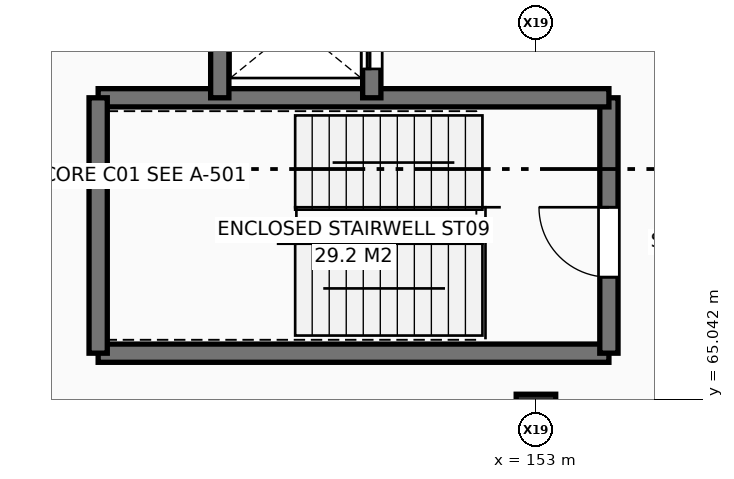
"""IFC4 building model, lengths in metres.
Left out: names, types, materials, properties, quantities, classifications, styles, units other than length and angle.
Written with IfcOpenShell. Run it as: python <this file> out.ifc"""

import sys

from ifc_helpers import new_model, si_unit, direction, frame, frame_2d, origin, origin_2d, place, context, subcontext, project, spatial, rectangle, extrude, element, fill, save


model = new_model("IFC4")
c1 = context("Model", 3, precision=1e-05, world=origin(), true_north=direction((0.0, 1.0)))
c2 = subcontext(c1, "Body", "Model", "MODEL_VIEW")
j1 = project(units=[si_unit("LENGTHUNIT", "METRE"), si_unit("PLANEANGLEUNIT", "RADIAN")], contexts=[c1])
p1 = place(None, origin())
s1 = spatial("IfcSite", under=j1, at=p1, CompositionType="ELEMENT")
p2 = place(p1, origin())
s2 = spatial("IfcBuilding", under=s1, at=p2, CompositionType="ELEMENT")
p3 = place(p2, frame((0.0, 0.0, 9.6)))
s3 = spatial("IfcBuildingStorey", under=s2, at=p3, CompositionType="ELEMENT", Elevation=9.6)
p4 = place(p3, frame((153.0, 64.8, 0.0), z_axis=(0.0, 0.0, 1.0), x_axis=(1.0, 0.0, 0.0)))
e1 = element("IfcColumn", 1, at=p4, inside=s3, PredefinedType="COLUMN", context=c2, shape_type="SweptSolid", body=[
    extrude(rectangle(XDim=0.65, YDim=0.65, at=origin_2d()), origin(), (0.0, 0.0, 1.0), 4.2),
])
p5 = place(p3, frame((145.8, 65.8, 0.0), z_axis=(0.0, 0.0, 1.0), x_axis=(1.0, 0.0, 0.0)))
e2 = element("IfcWall", 2, at=p5, inside=s3, PredefinedType="SHEAR", context=c2, shape_type="SweptSolid", body=[
    extrude(rectangle(XDim=8.4, YDim=0.3, at=frame_2d((4.2, 0.0))), origin(), (0.0, 0.0, 1.0), 3.92),
])
p6 = place(p3, frame((154.2, 65.8, 0.0), z_axis=(0.0, 0.0, 1.0), x_axis=(0.0, 1.0, 0.0)))
e3 = element("IfcWall", 3, at=p6, inside=s3, PredefinedType="SHEAR", context=c2, shape_type="SweptSolid", body=[
    extrude(rectangle(XDim=4.2, YDim=0.3, at=frame_2d((2.1, 0.0))), origin(), (0.0, 0.0, 1.0), 3.92),
])
p7 = place(p6, frame((1.25, 0.0, 0.0)))
e4 = element("IfcOpeningElement", 4, at=p7, cuts=e3, PredefinedType="OPENING", context=c2, shape_type="SweptSolid", body=[
    extrude(rectangle(XDim=1.15, YDim=2.2, at=frame_2d((0.575, 1.1))), frame((0.0, 0.16, 0.0), z_axis=(0.0, -1.0, 0.0), x_axis=(1.0, 0.0, 0.0)), (0.0, 0.0, 1.0), 0.32),
])
p8 = place(p3, frame((154.2, 70.0, 0.0), z_axis=(0.0, 0.0, 1.0), x_axis=(-1.0, 0.0, 0.0)))
e5 = element("IfcWall", 5, at=p8, inside=s3, PredefinedType="SHEAR", context=c2, shape_type="SweptSolid", body=[
    extrude(rectangle(XDim=8.4, YDim=0.3, at=frame_2d((4.2, 0.0))), origin(), (0.0, 0.0, 1.0), 3.92),
])
p9 = place(p3, frame((145.8, 70.0, 0.0), z_axis=(0.0, 0.0, 1.0), x_axis=(0.0, -1.0, 0.0)))
e6 = element("IfcWall", 6, at=p9, inside=s3, PredefinedType="SHEAR", context=c2, shape_type="SweptSolid", body=[
    extrude(rectangle(XDim=4.2, YDim=0.3, at=frame_2d((2.1, 0.0))), origin(), (0.0, 0.0, 1.0), 3.92),
])
p10 = place(p3, frame((147.8, 72.4, 0.0), z_axis=(0.0, 0.0, 1.0), x_axis=(0.0, -1.0, 0.0)))
e7 = element("IfcWall", 7, at=p10, inside=s3, PredefinedType="SHEAR", context=c2, shape_type="SweptSolid", body=[
    extrude(rectangle(XDim=2.4, YDim=0.3, at=frame_2d((1.2, 0.0))), origin(), (0.0, 0.0, 1.0), 3.92),
])
p11 = place(p3, frame((150.3, 70.0, 0.0), z_axis=(0.0, 0.0, 1.0), x_axis=(0.0, 1.0, 0.0)))
e8 = element("IfcWall", 8, at=p11, inside=s3, PredefinedType="SHEAR", context=c2, shape_type="SweptSolid", body=[
    extrude(rectangle(XDim=2.4, YDim=0.3, at=frame_2d((1.2, 0.0))), origin(), (0.0, 0.0, 1.0), 3.92),
])
p12 = place(p11, frame((0.475, 0.0, 0.0)))
e9 = element("IfcOpeningElement", 9, at=p12, cuts=e8, PredefinedType="OPENING", context=c2, shape_type="SweptSolid", body=[
    extrude(rectangle(XDim=1.45, YDim=2.35, at=frame_2d((0.725, 1.175))), frame((0.0, 0.16, 0.0), z_axis=(0.0, -1.0, 0.0), x_axis=(1.0, 0.0, 0.0)), (0.0, 0.0, 1.0), 0.32),
])
p13 = place(p7, origin())
e10 = element("IfcDoor", 10, at=p13, inside=s3, OperationType="SINGLE_SWING_RIGHT", PredefinedType="DOOR", context=c2, shape_type="SweptSolid", body=[
    extrude(rectangle(XDim=1.15, YDim=2.2, at=frame_2d((0.575, 1.1))), frame((0.0, 0.025, 0.0), z_axis=(0.0, -1.0, 0.0), x_axis=(1.0, 0.0, 0.0)), (0.0, 0.0, 1.0), 0.05),
])
fill(e4, e10)
p14 = place(p12, origin())
e11 = element("IfcDoor", 11, at=p14, inside=s3, OperationType="SLIDING_TO_LEFT", PredefinedType="DOOR", context=c2, shape_type="SweptSolid", body=[
    extrude(rectangle(XDim=1.45, YDim=2.35, at=frame_2d((0.725, 1.175))), frame((0.0, 0.025, 0.0), z_axis=(0.0, -1.0, 0.0), x_axis=(1.0, 0.0, 0.0)), (0.0, 0.0, 1.0), 0.05),
])
fill(e9, e11)
save(model, sys.argv[1])
